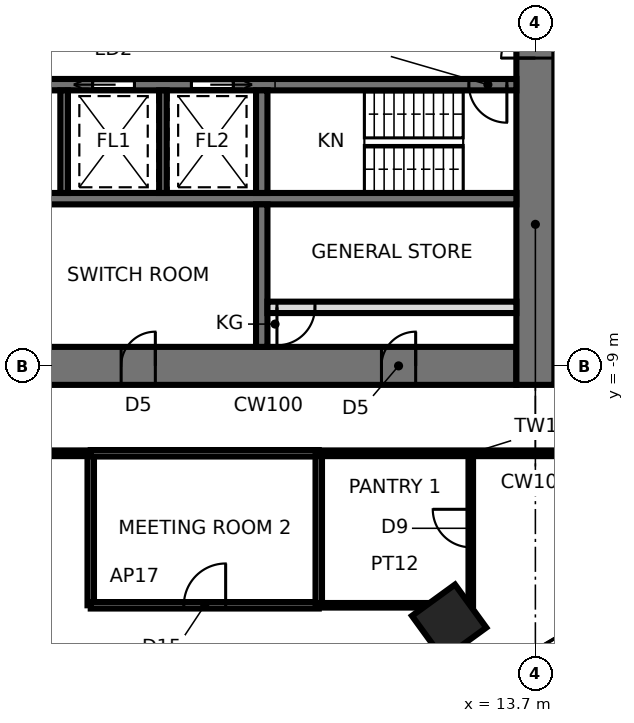
"""IFC4 building model, lengths in metres.
Left out: names, types, materials, properties, quantities, classifications, styles, units other than length and angle.
Written with IfcOpenShell. Run it as: python <this file> out.ifc"""

import sys

from ifc_helpers import new_model, si_unit, direction, frame, frame_2d, origin, origin_2d, place, context, subcontext, project, spatial, rectangle, extrude, element, fill, save


model = new_model("IFC4")
c1 = context("Model", 3, precision=1e-05, world=origin(), true_north=direction((0.0, 1.0)))
c2 = subcontext(c1, "Body", "Model", "MODEL_VIEW")
j1 = project(units=[si_unit("LENGTHUNIT", "METRE"), si_unit("PLANEANGLEUNIT", "RADIAN")], contexts=[c1])
p1 = place(None, origin())
s1 = spatial("IfcSite", under=j1, at=p1, CompositionType="ELEMENT")
p2 = place(p1, origin())
s2 = spatial("IfcBuilding", under=s1, at=p2, CompositionType="ELEMENT")
p3 = place(p2, frame((0.0, 0.0, 176.0)))
s3 = spatial("IfcBuildingStorey", under=s2, at=p3, CompositionType="ELEMENT", Elevation=176.0)
p4 = place(p3, frame((11.43, -15.733, 0.0), z_axis=(0.0, 0.0, 1.0), x_axis=(0.587785252292, -0.809016994375, 0.0)))
e1 = element("IfcColumn", 1, at=p4, inside=s3, PredefinedType="COLUMN", context=c2, shape_type="SweptSolid", body=[
    extrude(rectangle(XDim=1.4, YDim=1.4, at=origin_2d()), origin(), (0.0, 0.0, 1.0), 3.9),
])
p5 = place(p3, frame((-13.2, -9.0, 0.0), z_axis=(0.0, 0.0, 1.0), x_axis=(1.0, 0.0, 0.0)))
e2 = element("IfcWall", 2, at=p5, inside=s3, PredefinedType="SHEAR", context=c2, shape_type="SweptSolid", body=[
    extrude(rectangle(XDim=26.4, YDim=1.0, at=frame_2d((13.2, 0.0))), origin(), (0.0, 0.0, 1.0), 3.9),
])
p6 = place(p5, frame((2.65, 0.0, 0.0)))
e3 = element("IfcOpeningElement", 3, at=p6, cuts=e2, PredefinedType="OPENING", context=c2, shape_type="SweptSolid", body=[
    extrude(rectangle(XDim=0.9, YDim=2.1, at=frame_2d((0.45, 1.05))), frame((0.0, 0.51, 0.0), z_axis=(0.0, -1.0, 0.0), x_axis=(1.0, 0.0, 0.0)), (0.0, 0.0, 1.0), 1.02),
])
p7 = place(p5, frame((9.5, 0.0, 0.0)))
e4 = element("IfcOpeningElement", 4, at=p7, cuts=e2, PredefinedType="OPENING", context=c2, shape_type="SweptSolid", body=[
    extrude(rectangle(XDim=0.9, YDim=2.1, at=frame_2d((0.45, 1.05))), frame((0.0, 0.51, 0.0), z_axis=(0.0, -1.0, 0.0), x_axis=(1.0, 0.0, 0.0)), (0.0, 0.0, 1.0), 1.02),
])
p8 = place(p5, frame((16.0, 0.0, 0.0)))
e5 = element("IfcOpeningElement", 5, at=p8, cuts=e2, PredefinedType="OPENING", context=c2, shape_type="SweptSolid", body=[
    extrude(rectangle(XDim=0.9, YDim=2.1, at=frame_2d((0.45, 1.05))), frame((0.0, 0.51, 0.0), z_axis=(0.0, -1.0, 0.0), x_axis=(1.0, 0.0, 0.0)), (0.0, 0.0, 1.0), 1.02),
])
p9 = place(p5, frame((22.85, 0.0, 0.0)))
e6 = element("IfcOpeningElement", 6, at=p9, cuts=e2, PredefinedType="OPENING", context=c2, shape_type="SweptSolid", body=[
    extrude(rectangle(XDim=0.9, YDim=2.1, at=frame_2d((0.45, 1.05))), frame((0.0, 0.51, 0.0), z_axis=(0.0, -1.0, 0.0), x_axis=(1.0, 0.0, 0.0)), (0.0, 0.0, 1.0), 1.02),
])
p10 = place(p3, frame((13.7, -9.5, 0.0), z_axis=(0.0, 0.0, 1.0), x_axis=(0.0, 1.0, 0.0)))
e7 = element("IfcWall", 7, at=p10, inside=s3, PredefinedType="SHEAR", context=c2, shape_type="SweptSolid", body=[
    extrude(rectangle(XDim=19.0, YDim=1.0, at=frame_2d((9.5, 0.0))), origin(), (0.0, 0.0, 1.0), 3.9),
])
p11 = place(p10, frame((8.6, 0.0, 0.0)))
e8 = element("IfcOpeningElement", 8, at=p11, cuts=e7, PredefinedType="OPENING", context=c2, shape_type="SweptSolid", body=[
    extrude(rectangle(XDim=1.8, YDim=2.4, at=frame_2d((0.9, 1.2))), frame((0.0, 0.51, 0.0), z_axis=(0.0, -1.0, 0.0), x_axis=(1.0, 0.0, 0.0)), (0.0, 0.0, 1.0), 1.02),
])
p12 = place(p3, frame((-13.2, -1.6, 0.0), z_axis=(0.0, 0.0, 1.0), x_axis=(1.0, 0.0, 0.0)))
e9 = element("IfcWall", 9, at=p12, inside=s3, PredefinedType="SHEAR", context=c2, shape_type="SweptSolid", body=[
    extrude(rectangle(XDim=26.4, YDim=0.3, at=frame_2d((13.2, 0.0))), origin(), (0.0, 0.0, 1.0), 3.9),
])
p13 = place(p12, frame((25.15, 0.0, 0.0)))
e10 = element("IfcOpeningElement", 10, at=p13, cuts=e9, PredefinedType="OPENING", context=c2, shape_type="SweptSolid", body=[
    extrude(rectangle(XDim=1.0, YDim=2.1, at=frame_2d((0.5, 1.05))), frame((0.0, 0.16, 0.0), z_axis=(0.0, -1.0, 0.0), x_axis=(1.0, 0.0, 0.0)), (0.0, 0.0, 1.0), 0.32),
])
p14 = place(p12, frame((7.55, 0.0, 0.0)))
e11 = element("IfcOpeningElement", 11, at=p14, cuts=e9, PredefinedType="OPENING", context=c2, shape_type="SweptSolid", body=[
    extrude(rectangle(XDim=0.9, YDim=2.1, at=frame_2d((0.45, 1.05))), frame((0.0, 0.16, 0.0), z_axis=(0.0, -1.0, 0.0), x_axis=(1.0, 0.0, 0.0)), (0.0, 0.0, 1.0), 0.32),
])
p15 = place(p12, frame((10.15, 0.0, 0.0)))
e12 = element("IfcOpeningElement", 12, at=p15, cuts=e9, PredefinedType="OPENING", context=c2, shape_type="SweptSolid", body=[
    extrude(rectangle(XDim=0.9, YDim=2.1, at=frame_2d((0.45, 1.05))), frame((0.0, 0.16, 0.0), z_axis=(0.0, -1.0, 0.0), x_axis=(1.0, 0.0, 0.0)), (0.0, 0.0, 1.0), 0.32),
])
p16 = place(p12, frame((12.75, 0.0, 0.0)))
e13 = element("IfcOpeningElement", 13, at=p16, cuts=e9, PredefinedType="OPENING", context=c2, shape_type="SweptSolid", body=[
    extrude(rectangle(XDim=0.9, YDim=2.1, at=frame_2d((0.45, 1.05))), frame((0.0, 0.16, 0.0), z_axis=(0.0, -1.0, 0.0), x_axis=(1.0, 0.0, 0.0)), (0.0, 0.0, 1.0), 0.32),
])
p17 = place(p12, frame((15.25, 0.0, 0.0)))
e14 = element("IfcOpeningElement", 14, at=p17, cuts=e9, PredefinedType="OPENING", context=c2, shape_type="SweptSolid", body=[
    extrude(rectangle(XDim=1.1, YDim=2.3, at=frame_2d((0.55, 1.15))), frame((0.0, 0.16, 0.0), z_axis=(0.0, -1.0, 0.0), x_axis=(1.0, 0.0, 0.0)), (0.0, 0.0, 1.0), 0.32),
])
p18 = place(p12, frame((17.85, 0.0, 0.0)))
e15 = element("IfcOpeningElement", 15, at=p18, cuts=e9, PredefinedType="OPENING", context=c2, shape_type="SweptSolid", body=[
    extrude(rectangle(XDim=1.1, YDim=2.3, at=frame_2d((0.55, 1.15))), frame((0.0, 0.16, 0.0), z_axis=(0.0, -1.0, 0.0), x_axis=(1.0, 0.0, 0.0)), (0.0, 0.0, 1.0), 0.32),
])
p19 = place(p12, frame((4.85, 0.0, 0.0)))
e16 = element("IfcOpeningElement", 16, at=p19, cuts=e9, PredefinedType="OPENING", context=c2, shape_type="SweptSolid", body=[
    extrude(rectangle(XDim=1.1, YDim=2.3, at=frame_2d((0.55, 1.15))), frame((0.0, 0.16, 0.0), z_axis=(0.0, -1.0, 0.0), x_axis=(1.0, 0.0, 0.0)), (0.0, 0.0, 1.0), 0.32),
])
p20 = place(p12, frame((2.25, 0.0, 0.0)))
e17 = element("IfcOpeningElement", 17, at=p20, cuts=e9, PredefinedType="OPENING", context=c2, shape_type="SweptSolid", body=[
    extrude(rectangle(XDim=1.1, YDim=2.3, at=frame_2d((0.55, 1.15))), frame((0.0, 0.16, 0.0), z_axis=(0.0, -1.0, 0.0), x_axis=(1.0, 0.0, 0.0)), (0.0, 0.0, 1.0), 0.32),
])
p21 = place(p12, frame((0.35, 0.0, 0.0)))
e18 = element("IfcOpeningElement", 18, at=p21, cuts=e9, PredefinedType="OPENING", context=c2, shape_type="SweptSolid", body=[
    extrude(rectangle(XDim=0.9, YDim=2.1, at=frame_2d((0.45, 1.05))), frame((0.0, 0.16, 0.0), z_axis=(0.0, -1.0, 0.0), x_axis=(1.0, 0.0, 0.0)), (0.0, 0.0, 1.0), 0.32),
])
p22 = place(p3, frame((-13.2, -4.6, 0.0), z_axis=(0.0, 0.0, 1.0), x_axis=(1.0, 0.0, 0.0)))
e19 = element("IfcWall", 19, at=p22, inside=s3, PredefinedType="SHEAR", context=c2, shape_type="SweptSolid", body=[
    extrude(rectangle(XDim=26.4, YDim=0.3, at=frame_2d((13.2, 0.0))), origin(), (0.0, 0.0, 1.0), 3.9),
])
p23 = place(p3, frame((6.5, -1.75, 0.0), z_axis=(0.0, 0.0, 1.0), x_axis=(0.0, -1.0, 0.0)))
e20 = element("IfcWall", 20, at=p23, inside=s3, PredefinedType="SHEAR", context=c2, shape_type="SweptSolid", body=[
    extrude(rectangle(XDim=2.7, YDim=0.3, at=frame_2d((1.35, 0.0))), origin(), (0.0, 0.0, 1.0), 3.9),
])
p24 = place(p3, frame((6.5, -4.75, 0.0), z_axis=(0.0, 0.0, 1.0), x_axis=(0.0, -1.0, 0.0)))
e21 = element("IfcWall", 21, at=p24, inside=s3, PredefinedType="SHEAR", context=c2, shape_type="SweptSolid", body=[
    extrude(rectangle(XDim=3.75, YDim=0.3, at=frame_2d((1.875, 0.0))), origin(), (0.0, 0.0, 1.0), 3.9),
])
for number, where, z_axis, x_axis in (
    (22, (1.3, -1.75, 0.0), (0.0, 0.0, 1.0), (0.0, -1.0, 0.0)),
    (23, (3.9, -1.75, 0.0), (0.0, 0.0, 1.0), (0.0, -1.0, 0.0)),
):
    element("IfcWall", number, at=place(p3, frame(where, z_axis=z_axis, x_axis=x_axis)), inside=s3, PredefinedType="SHEAR", context=c2, shape_type="SweptSolid", body=[
        extrude(rectangle(XDim=2.7, YDim=0.2, at=frame_2d((1.35, 0.0))), origin(), (0.0, 0.0, 1.0), 3.9),
    ])
p25 = place(p3, frame((6.65, -7.46, 0.0), z_axis=(0.0, 0.0, 1.0), x_axis=(1.0, 0.0, 0.0)))
e24 = element("IfcWall", 24, at=p25, inside=s3, PredefinedType="PARTITIONING", context=c2, shape_type="SweptSolid", body=[
    extrude(rectangle(XDim=6.55, YDim=0.3, at=frame_2d((3.275, 0.0))), origin(), (0.0, 0.0, 1.0), 3.74),
])
p26 = place(p25, frame((0.25, 0.0, 0.0)))
e25 = element("IfcOpeningElement", 25, at=p26, cuts=e24, PredefinedType="OPENING", context=c2, shape_type="SweptSolid", body=[
    extrude(rectangle(XDim=1.0, YDim=2.4, at=frame_2d((0.5, 1.2))), frame((0.0, 0.16, 0.0), z_axis=(0.0, -1.0, 0.0), x_axis=(1.0, 0.0, 0.0)), (0.0, 0.0, 1.0), 0.32),
])
p27 = place(p3, frame((-16.0, -11.3, 0.0), z_axis=(0.0, 0.0, 1.0), x_axis=(1.0, 0.0, 0.0)))
e26 = element("IfcWall", 26, at=p27, inside=s3, PredefinedType="PARTITIONING", context=c2, shape_type="SweptSolid", body=[
    extrude(rectangle(XDim=18.0, YDim=0.15, at=frame_2d((9.0, 0.0))), origin(), (0.0, 0.0, 1.0), 3.74),
])
p28 = place(p27, frame((4.113, 0.0, 0.0)))
e27 = element("IfcOpeningElement", 27, at=p28, cuts=e26, PredefinedType="OPENING", context=c2, shape_type="SweptSolid", body=[
    extrude(rectangle(XDim=1.2, YDim=2.4, at=frame_2d((0.6, 1.2))), frame((0.0, 0.085, 0.0), z_axis=(0.0, -1.0, 0.0), x_axis=(1.0, 0.0, 0.0)), (0.0, 0.0, 1.0), 0.17),
])
p29 = place(p3, frame((2.0, -11.3, 0.0), z_axis=(0.0, 0.0, 1.0), x_axis=(0.0, -1.0, 0.0)))
e28 = element("IfcWall", 28, at=p29, inside=s3, PredefinedType="PARTITIONING", context=c2, shape_type="SweptSolid", body=[
    extrude(rectangle(XDim=4.0, YDim=0.17, at=frame_2d((2.0, 0.0))), origin(), (0.0, 0.0, 1.0), 3.74),
])
p30 = place(p3, frame((2.0, -15.3, 0.0), z_axis=(0.0, 0.0, 1.0), x_axis=(1.0, 0.0, 0.0)))
e29 = element("IfcWall", 29, at=p30, inside=s3, PredefinedType="PARTITIONING", context=c2, shape_type="SweptSolid", body=[
    extrude(rectangle(XDim=6.0, YDim=0.17, at=frame_2d((3.0, 0.0))), origin(), (0.0, 0.0, 1.0), 3.334),
])
p31 = place(p30, frame((2.45, 0.0, 0.0)))
e30 = element("IfcOpeningElement", 30, at=p31, cuts=e29, PredefinedType="OPENING", context=c2, shape_type="SweptSolid", body=[
    extrude(rectangle(XDim=1.1, YDim=2.4, at=frame_2d((0.55, 1.2))), frame((0.0, 0.095, 0.0), z_axis=(0.0, -1.0, 0.0), x_axis=(1.0, 0.0, 0.0)), (0.0, 0.0, 1.0), 0.19),
])
p32 = place(p3, frame((8.0, -11.3, 0.0), z_axis=(0.0, 0.0, 1.0), x_axis=(-1.0, 0.0, 0.0)))
e31 = element("IfcWall", 31, at=p32, inside=s3, PredefinedType="PARTITIONING", context=c2, shape_type="SweptSolid", body=[
    extrude(rectangle(XDim=6.0, YDim=0.17, at=frame_2d((3.0, 0.0))), origin(), (0.0, 0.0, 1.0), 3.74),
])
p33 = place(p3, frame((8.0, -11.3, 0.0), z_axis=(0.0, 0.0, 1.0), x_axis=(0.0, -1.0, 0.0)))
e32 = element("IfcWall", 32, at=p33, inside=s3, PredefinedType="PARTITIONING", context=c2, shape_type="SweptSolid", body=[
    extrude(rectangle(XDim=4.0, YDim=0.17, at=frame_2d((2.0, 0.0))), origin(), (0.0, 0.0, 1.0), 3.74),
])
p34 = place(p3, frame((8.0, -15.3, 0.0), z_axis=(0.0, 0.0, 1.0), x_axis=(1.0, 0.0, 0.0)))
e33 = element("IfcWall", 33, at=p34, inside=s3, PredefinedType="PARTITIONING", context=c2, shape_type="SweptSolid", body=[
    extrude(rectangle(XDim=4.0, YDim=0.12, at=frame_2d((2.0, 0.0))), origin(), (0.0, 0.0, 1.0), 3.74),
])
p35 = place(p3, frame((12.0, -15.3, 0.0), z_axis=(0.0, 0.0, 1.0), x_axis=(0.0, 1.0, 0.0)))
e34 = element("IfcWall", 34, at=p35, inside=s3, PredefinedType="PARTITIONING", context=c2, shape_type="SweptSolid", body=[
    extrude(rectangle(XDim=4.0, YDim=0.12, at=frame_2d((2.0, 0.0))), origin(), (0.0, 0.0, 1.0), 3.74),
])
p36 = place(p35, frame((1.526, 0.0, 0.0)))
e35 = element("IfcOpeningElement", 35, at=p36, cuts=e34, PredefinedType="OPENING", context=c2, shape_type="SweptSolid", body=[
    extrude(rectangle(XDim=1.0, YDim=2.4, at=frame_2d((0.5, 1.2))), frame((0.0, 0.07, 0.0), z_axis=(0.0, -1.0, 0.0), x_axis=(1.0, 0.0, 0.0)), (0.0, 0.0, 1.0), 0.14),
])
p37 = place(p3, frame((8.0, -11.3, 0.0), z_axis=(0.0, 0.0, 1.0), x_axis=(1.0, 0.0, 0.0)))
e36 = element("IfcWall", 36, at=p37, inside=s3, PredefinedType="PARTITIONING", context=c2, shape_type="SweptSolid", body=[
    extrude(rectangle(XDim=8.0, YDim=0.15, at=frame_2d((4.0, 0.0))), origin(), (0.0, 0.0, 1.0), 3.74),
])
p38 = place(p11, origin())
e37 = element("IfcDoor", 37, at=p38, inside=s3, OperationType="DOUBLE_DOOR_SINGLE_SWING", PredefinedType="DOOR", context=c2, shape_type="SweptSolid", body=[
    extrude(rectangle(XDim=1.72, YDim=2.36, at=frame_2d((0.9, 1.18))), frame((0.0, 0.025, 0.0), z_axis=(0.0, -1.0, 0.0), x_axis=(1.0, 0.0, 0.0)), (0.0, 0.0, 1.0), 0.05),
    extrude(rectangle(XDim=0.04, YDim=2.4, at=frame_2d((0.02, 1.2))), frame((0.0, 0.25, 0.0), z_axis=(0.0, -1.0, 0.0), x_axis=(1.0, 0.0, 0.0)), (0.0, 0.0, 1.0), 0.5),
    extrude(rectangle(XDim=0.04, YDim=2.4, at=frame_2d((1.78, 1.2))), frame((0.0, 0.25, 0.0), z_axis=(0.0, -1.0, 0.0), x_axis=(1.0, 0.0, 0.0)), (0.0, 0.0, 1.0), 0.5),
    extrude(rectangle(XDim=1.72, YDim=0.04, at=frame_2d((0.9, 2.38))), frame((0.0, 0.25, 0.0), z_axis=(0.0, -1.0, 0.0), x_axis=(1.0, 0.0, 0.0)), (0.0, 0.0, 1.0), 0.5),
])
fill(e8, e37)
p39 = place(p13, frame((1.0, 0.0, 0.0), z_axis=(0.0, 0.0, 1.0), x_axis=(-1.0, 0.0, 0.0)))
e38 = element("IfcDoor", 38, at=p39, inside=s3, OperationType="SINGLE_SWING_LEFT", PredefinedType="DOOR", context=c2, shape_type="SweptSolid", body=[
    extrude(rectangle(XDim=1.0, YDim=2.1, at=frame_2d((0.5, 1.05))), frame((0.0, 0.025, 0.0), z_axis=(0.0, -1.0, 0.0), x_axis=(1.0, 0.0, 0.0)), (0.0, 0.0, 1.0), 0.05),
])
fill(e10, e38)
p40 = place(p17, frame((1.1, 0.0, 0.0), z_axis=(0.0, 0.0, 1.0), x_axis=(-1.0, 0.0, 0.0)))
e39 = element("IfcDoor", 39, at=p40, inside=s3, OperationType="SLIDING_TO_RIGHT", PredefinedType="DOOR", context=c2, shape_type="SweptSolid", body=[
    extrude(rectangle(XDim=1.1, YDim=2.3, at=frame_2d((0.55, 1.15))), frame((0.0, 0.025, 0.0), z_axis=(0.0, -1.0, 0.0), x_axis=(1.0, 0.0, 0.0)), (0.0, 0.0, 1.0), 0.05),
])
fill(e14, e39)
p41 = place(p18, frame((1.1, 0.0, 0.0), z_axis=(0.0, 0.0, 1.0), x_axis=(-1.0, 0.0, 0.0)))
e40 = element("IfcDoor", 40, at=p41, inside=s3, OperationType="SLIDING_TO_LEFT", PredefinedType="DOOR", context=c2, shape_type="SweptSolid", body=[
    extrude(rectangle(XDim=1.1, YDim=2.3, at=frame_2d((0.55, 1.15))), frame((0.0, 0.025, 0.0), z_axis=(0.0, -1.0, 0.0), x_axis=(1.0, 0.0, 0.0)), (0.0, 0.0, 1.0), 0.05),
])
fill(e15, e40)
p42 = place(p8, origin())
e41 = element("IfcDoor", 41, at=p42, inside=s3, OperationType="SINGLE_SWING_RIGHT", PredefinedType="DOOR", context=c2, shape_type="SweptSolid", body=[
    extrude(rectangle(XDim=0.82, YDim=2.06, at=frame_2d((0.45, 1.03))), frame((0.0, 0.025, 0.0), z_axis=(0.0, -1.0, 0.0), x_axis=(1.0, 0.0, 0.0)), (0.0, 0.0, 1.0), 0.05),
    extrude(rectangle(XDim=0.04, YDim=2.1, at=frame_2d((0.02, 1.05))), frame((0.0, 0.25, 0.0), z_axis=(0.0, -1.0, 0.0), x_axis=(1.0, 0.0, 0.0)), (0.0, 0.0, 1.0), 0.5),
    extrude(rectangle(XDim=0.04, YDim=2.1, at=frame_2d((0.88, 1.05))), frame((0.0, 0.25, 0.0), z_axis=(0.0, -1.0, 0.0), x_axis=(1.0, 0.0, 0.0)), (0.0, 0.0, 1.0), 0.5),
    extrude(rectangle(XDim=0.82, YDim=0.04, at=frame_2d((0.45, 2.08))), frame((0.0, 0.25, 0.0), z_axis=(0.0, -1.0, 0.0), x_axis=(1.0, 0.0, 0.0)), (0.0, 0.0, 1.0), 0.5),
])
fill(e5, e41)
p43 = place(p9, origin())
e42 = element("IfcDoor", 42, at=p43, inside=s3, OperationType="SINGLE_SWING_RIGHT", PredefinedType="DOOR", context=c2, shape_type="SweptSolid", body=[
    extrude(rectangle(XDim=0.82, YDim=2.06, at=frame_2d((0.45, 1.03))), frame((0.0, 0.025, 0.0), z_axis=(0.0, -1.0, 0.0), x_axis=(1.0, 0.0, 0.0)), (0.0, 0.0, 1.0), 0.05),
    extrude(rectangle(XDim=0.04, YDim=2.1, at=frame_2d((0.02, 1.05))), frame((0.0, 0.25, 0.0), z_axis=(0.0, -1.0, 0.0), x_axis=(1.0, 0.0, 0.0)), (0.0, 0.0, 1.0), 0.5),
    extrude(rectangle(XDim=0.04, YDim=2.1, at=frame_2d((0.88, 1.05))), frame((0.0, 0.25, 0.0), z_axis=(0.0, -1.0, 0.0), x_axis=(1.0, 0.0, 0.0)), (0.0, 0.0, 1.0), 0.5),
    extrude(rectangle(XDim=0.82, YDim=0.04, at=frame_2d((0.45, 2.08))), frame((0.0, 0.25, 0.0), z_axis=(0.0, -1.0, 0.0), x_axis=(1.0, 0.0, 0.0)), (0.0, 0.0, 1.0), 0.5),
])
fill(e6, e42)
p44 = place(p26, frame((1.0, 0.0, 0.0), z_axis=(0.0, 0.0, 1.0), x_axis=(-1.0, 0.0, 0.0)))
e43 = element("IfcDoor", 43, at=p44, inside=s3, OperationType="SINGLE_SWING_RIGHT", PredefinedType="DOOR", context=c2, shape_type="SweptSolid", body=[
    extrude(rectangle(XDim=1.0, YDim=2.4, at=frame_2d((0.5, 1.2))), frame((0.0, 0.025, 0.0), z_axis=(0.0, -1.0, 0.0), x_axis=(1.0, 0.0, 0.0)), (0.0, 0.0, 1.0), 0.05),
])
fill(e25, e43)
p45 = place(p31, origin())
e44 = element("IfcDoor", 44, at=p45, inside=s3, OperationType="SINGLE_SWING_RIGHT", PredefinedType="DOOR", context=c2, shape_type="SweptSolid", body=[
    extrude(rectangle(XDim=1.1, YDim=2.4, at=frame_2d((0.55, 1.2))), frame((0.0, 0.025, 0.0), z_axis=(0.0, -1.0, 0.0), x_axis=(1.0, 0.0, 0.0)), (0.0, 0.0, 1.0), 0.05),
])
fill(e30, e44)
p46 = place(p36, origin())
e45 = element("IfcDoor", 45, at=p46, inside=s3, OperationType="SINGLE_SWING_RIGHT", PredefinedType="DOOR", context=c2, shape_type="SweptSolid", body=[
    extrude(rectangle(XDim=1.0, YDim=2.4, at=frame_2d((0.5, 1.2))), frame((0.0, 0.025, 0.0), z_axis=(0.0, -1.0, 0.0), x_axis=(1.0, 0.0, 0.0)), (0.0, 0.0, 1.0), 0.05),
])
fill(e35, e45)
save(model, sys.argv[1])
